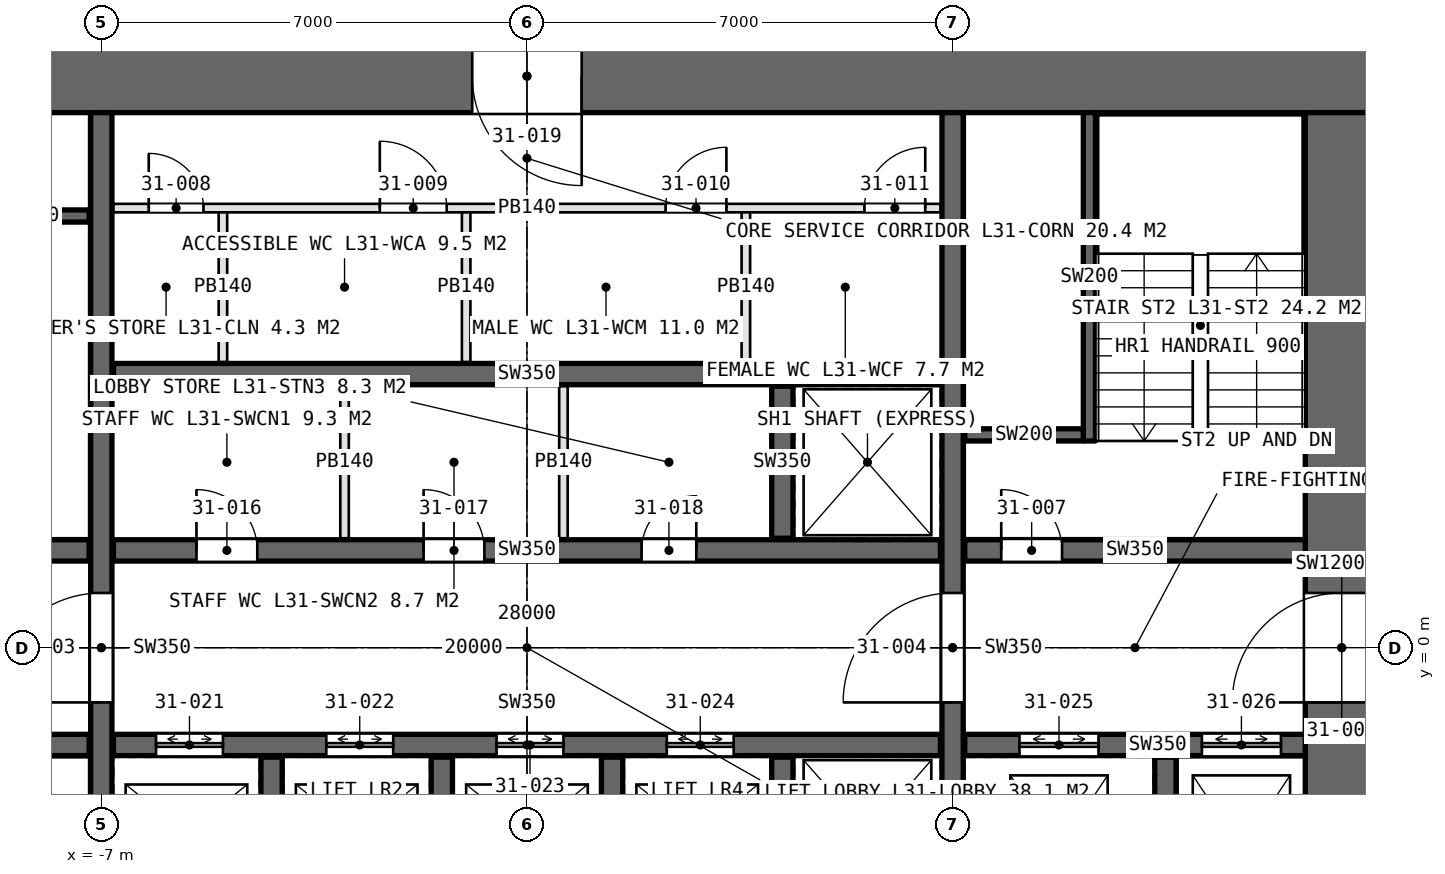
"""IFC4 building model, lengths in metres.
Left out: names, types, materials, properties, quantities, classifications, styles, units other than length and angle.
Written with IfcOpenShell. Run it as: python <this file> out.ifc"""

import sys

from ifc_helpers import new_model, si_unit, direction, frame, frame_2d, origin, place, context, subcontext, project, spatial, rectangle, extrude, element, fill, save


model = new_model("IFC4")
c1 = context("Model", 3, precision=1e-05, world=origin(), true_north=direction((0.0, 1.0)))
c2 = subcontext(c1, "Body", "Model", "MODEL_VIEW")
j1 = project(units=[si_unit("LENGTHUNIT", "METRE"), si_unit("PLANEANGLEUNIT", "RADIAN")], contexts=[c1])
p1 = place(None, origin())
s1 = spatial("IfcSite", under=j1, at=p1, CompositionType="ELEMENT")
p2 = place(p1, origin())
s2 = spatial("IfcBuilding", under=s1, at=p2, CompositionType="ELEMENT")
p3 = place(p2, frame((0.0, 0.0, 147.0)))
s3 = spatial("IfcBuildingStorey", under=s2, at=p3, CompositionType="ELEMENT", Elevation=147.0)
p4 = place(p3, frame((14.0, 9.4, 0.0), z_axis=(0.0, 0.0, 1.0), x_axis=(-1.0, 0.0, 0.0)))
e1 = element("IfcWall", 1, at=p4, inside=s3, PredefinedType="SHEAR", context=c2, shape_type="SweptSolid", body=[
    extrude(rectangle(XDim=28.0, YDim=1.2, at=frame_2d((14.0, 0.0))), origin(), (0.0, 0.0, 1.0), 4.2),
])
p5 = place(p4, frame((24.0, 0.0, 0.0)))
e2 = element("IfcOpeningElement", 2, at=p5, cuts=e1, PredefinedType="OPENING", context=c2, shape_type="SweptSolid", body=[
    extrude(rectangle(XDim=1.0, YDim=2.4, at=frame_2d((0.5, 1.2))), frame((0.0, 0.61, 0.0), z_axis=(0.0, -1.0, 0.0), x_axis=(1.0, 0.0, 0.0)), (0.0, 0.0, 1.0), 1.22),
])
p6 = place(p4, frame((13.1, 0.0, 0.0)))
e3 = element("IfcOpeningElement", 3, at=p6, cuts=e1, PredefinedType="OPENING", context=c2, shape_type="SweptSolid", body=[
    extrude(rectangle(XDim=1.8, YDim=2.4, at=frame_2d((0.9, 1.2))), frame((0.0, 0.61, 0.0), z_axis=(0.0, -1.0, 0.0), x_axis=(1.0, 0.0, 0.0)), (0.0, 0.0, 1.0), 1.22),
])
p7 = place(p3, frame((13.4, -8.8, 0.0), z_axis=(0.0, 0.0, 1.0), x_axis=(0.0, 1.0, 0.0)))
e4 = element("IfcWall", 4, at=p7, inside=s3, PredefinedType="SHEAR", context=c2, shape_type="SweptSolid", body=[
    extrude(rectangle(XDim=17.6, YDim=1.2, at=frame_2d((8.8, 0.0))), origin(), (0.0, 0.0, 1.0), 4.2),
])
p8 = place(p7, frame((7.9, 0.0, 0.0)))
e5 = element("IfcOpeningElement", 5, at=p8, cuts=e4, PredefinedType="OPENING", context=c2, shape_type="SweptSolid", body=[
    extrude(rectangle(XDim=1.8, YDim=2.4, at=frame_2d((0.9, 1.2))), frame((0.0, 0.61, 0.0), z_axis=(0.0, -1.0, 0.0), x_axis=(1.0, 0.0, 0.0)), (0.0, 0.0, 1.0), 1.22),
])
p9 = place(p3, frame((-7.0, -8.8, 0.0), z_axis=(0.0, 0.0, 1.0), x_axis=(0.0, 1.0, 0.0)))
e6 = element("IfcWall", 6, at=p9, inside=s3, PredefinedType="SHEAR", context=c2, shape_type="SweptSolid", body=[
    extrude(rectangle(XDim=17.6, YDim=0.35, at=frame_2d((8.8, 0.0))), origin(), (0.0, 0.0, 1.0), 4.2),
])
p10 = place(p9, frame((7.9, 0.0, 0.0)))
e7 = element("IfcOpeningElement", 7, at=p10, cuts=e6, PredefinedType="OPENING", context=c2, shape_type="SweptSolid", body=[
    extrude(rectangle(XDim=1.8, YDim=2.4, at=frame_2d((0.9, 1.2))), frame((0.0, 0.185, 0.0), z_axis=(0.0, -1.0, 0.0), x_axis=(1.0, 0.0, 0.0)), (0.0, 0.0, 1.0), 0.37),
])
p11 = place(p3, frame((7.0, -8.8, 0.0), z_axis=(0.0, 0.0, 1.0), x_axis=(0.0, 1.0, 0.0)))
e8 = element("IfcWall", 8, at=p11, inside=s3, PredefinedType="SHEAR", context=c2, shape_type="SweptSolid", body=[
    extrude(rectangle(XDim=17.6, YDim=0.35, at=frame_2d((8.8, 0.0))), origin(), (0.0, 0.0, 1.0), 4.2),
])
p12 = place(p11, frame((7.9, 0.0, 0.0)))
e9 = element("IfcOpeningElement", 9, at=p12, cuts=e8, PredefinedType="OPENING", context=c2, shape_type="SweptSolid", body=[
    extrude(rectangle(XDim=1.8, YDim=2.4, at=frame_2d((0.9, 1.2))), frame((0.0, 0.185, 0.0), z_axis=(0.0, -1.0, 0.0), x_axis=(1.0, 0.0, 0.0)), (0.0, 0.0, 1.0), 0.37),
])
p13 = place(p3, frame((-6.8, 1.6, 0.0), z_axis=(0.0, 0.0, 1.0), x_axis=(1.0, 0.0, 0.0)))
e10 = element("IfcWall", 10, at=p13, inside=s3, PredefinedType="SHEAR", context=c2, shape_type="SweptSolid", body=[
    extrude(rectangle(XDim=13.6, YDim=0.35, at=frame_2d((6.8, 0.0))), origin(), (0.0, 0.0, 1.0), 4.2),
])
p14 = place(p13, frame((1.365, 0.0, 0.0)))
e11 = element("IfcOpeningElement", 11, at=p14, cuts=e10, PredefinedType="OPENING", context=c2, shape_type="SweptSolid", body=[
    extrude(rectangle(XDim=1.0, YDim=2.4, at=frame_2d((0.5, 1.2))), frame((0.0, 0.185, 0.0), z_axis=(0.0, -1.0, 0.0), x_axis=(1.0, 0.0, 0.0)), (0.0, 0.0, 1.0), 0.37),
])
p15 = place(p13, frame((5.1, 0.0, 0.0)))
e12 = element("IfcOpeningElement", 12, at=p15, cuts=e10, PredefinedType="OPENING", context=c2, shape_type="SweptSolid", body=[
    extrude(rectangle(XDim=1.0, YDim=2.4, at=frame_2d((0.5, 1.2))), frame((0.0, 0.185, 0.0), z_axis=(0.0, -1.0, 0.0), x_axis=(1.0, 0.0, 0.0)), (0.0, 0.0, 1.0), 0.37),
])
p16 = place(p13, frame((8.685, 0.0, 0.0)))
e13 = element("IfcOpeningElement", 13, at=p16, cuts=e10, PredefinedType="OPENING", context=c2, shape_type="SweptSolid", body=[
    extrude(rectangle(XDim=0.9, YDim=2.4, at=frame_2d((0.45, 1.2))), frame((0.0, 0.185, 0.0), z_axis=(0.0, -1.0, 0.0), x_axis=(1.0, 0.0, 0.0)), (0.0, 0.0, 1.0), 0.37),
])
p17 = place(p3, frame((-6.8, -1.6, 0.0), z_axis=(0.0, 0.0, 1.0), x_axis=(1.0, 0.0, 0.0)))
e14 = element("IfcWall", 14, at=p17, inside=s3, PredefinedType="SHEAR", context=c2, shape_type="SweptSolid", body=[
    extrude(rectangle(XDim=13.6, YDim=0.35, at=frame_2d((6.8, 0.0))), origin(), (0.0, 0.0, 1.0), 4.2),
])
p18 = place(p17, frame((0.7, 0.0, 0.0)))
e15 = element("IfcOpeningElement", 15, at=p18, cuts=e14, PredefinedType="OPENING", context=c2, shape_type="SweptSolid", body=[
    extrude(rectangle(XDim=1.1, YDim=2.4, at=frame_2d((0.55, 1.2))), frame((0.0, 0.185, 0.0), z_axis=(0.0, -1.0, 0.0), x_axis=(1.0, 0.0, 0.0)), (0.0, 0.0, 1.0), 0.37),
])
p19 = place(p17, frame((3.5, 0.0, 0.0)))
e16 = element("IfcOpeningElement", 16, at=p19, cuts=e14, PredefinedType="OPENING", context=c2, shape_type="SweptSolid", body=[
    extrude(rectangle(XDim=1.1, YDim=2.4, at=frame_2d((0.55, 1.2))), frame((0.0, 0.185, 0.0), z_axis=(0.0, -1.0, 0.0), x_axis=(1.0, 0.0, 0.0)), (0.0, 0.0, 1.0), 0.37),
])
p20 = place(p17, frame((6.3, 0.0, 0.0)))
e17 = element("IfcOpeningElement", 17, at=p20, cuts=e14, PredefinedType="OPENING", context=c2, shape_type="SweptSolid", body=[
    extrude(rectangle(XDim=1.1, YDim=2.4, at=frame_2d((0.55, 1.2))), frame((0.0, 0.185, 0.0), z_axis=(0.0, -1.0, 0.0), x_axis=(1.0, 0.0, 0.0)), (0.0, 0.0, 1.0), 0.37),
])
p21 = place(p17, frame((9.1, 0.0, 0.0)))
e18 = element("IfcOpeningElement", 18, at=p21, cuts=e14, PredefinedType="OPENING", context=c2, shape_type="SweptSolid", body=[
    extrude(rectangle(XDim=1.1, YDim=2.4, at=frame_2d((0.55, 1.2))), frame((0.0, 0.185, 0.0), z_axis=(0.0, -1.0, 0.0), x_axis=(1.0, 0.0, 0.0)), (0.0, 0.0, 1.0), 0.37),
])
p22 = place(p3, frame((-6.8, 4.5, 0.0), z_axis=(0.0, 0.0, 1.0), x_axis=(1.0, 0.0, 0.0)))
e19 = element("IfcWall", 19, at=p22, inside=s3, PredefinedType="SHEAR", context=c2, shape_type="SweptSolid", body=[
    extrude(rectangle(XDim=13.6, YDim=0.35, at=frame_2d((6.8, 0.0))), origin(), (0.0, 0.0, 1.0), 4.2),
])
for number, where, z_axis, x_axis in (
    (20, (-12.8, 1.6, 0.0), (0.0, 0.0, 1.0), (1.0, 0.0, 0.0)),
    (21, (-12.8, -1.6, 0.0), (0.0, 0.0, 1.0), (1.0, 0.0, 0.0)),
):
    element("IfcWall", number, at=place(p3, frame(where, z_axis=z_axis, x_axis=x_axis)), inside=s3, PredefinedType="SHEAR", context=c2, shape_type="SweptSolid", body=[
        extrude(rectangle(XDim=5.6, YDim=0.35, at=frame_2d((2.8, 0.0))), origin(), (0.0, 0.0, 1.0), 4.2),
    ])
p23 = place(p3, frame((7.2, 1.6, 0.0), z_axis=(0.0, 0.0, 1.0), x_axis=(1.0, 0.0, 0.0)))
e22 = element("IfcWall", 22, at=p23, inside=s3, PredefinedType="SHEAR", context=c2, shape_type="SweptSolid", body=[
    extrude(rectangle(XDim=5.6, YDim=0.35, at=frame_2d((2.8, 0.0))), origin(), (0.0, 0.0, 1.0), 4.2),
])
p24 = place(p23, frame((0.6, 0.0, 0.0)))
e23 = element("IfcOpeningElement", 23, at=p24, cuts=e22, PredefinedType="OPENING", context=c2, shape_type="SweptSolid", body=[
    extrude(rectangle(XDim=1.0, YDim=2.4, at=frame_2d((0.5, 1.2))), frame((0.0, 0.185, 0.0), z_axis=(0.0, -1.0, 0.0), x_axis=(1.0, 0.0, 0.0)), (0.0, 0.0, 1.0), 0.37),
])
p25 = place(p3, frame((7.2, -1.6, 0.0), z_axis=(0.0, 0.0, 1.0), x_axis=(1.0, 0.0, 0.0)))
e24 = element("IfcWall", 24, at=p25, inside=s3, PredefinedType="SHEAR", context=c2, shape_type="SweptSolid", body=[
    extrude(rectangle(XDim=5.6, YDim=0.35, at=frame_2d((2.8, 0.0))), origin(), (0.0, 0.0, 1.0), 4.2),
])
p26 = place(p25, frame((0.9, 0.0, 0.0)))
e25 = element("IfcOpeningElement", 25, at=p26, cuts=e24, PredefinedType="OPENING", context=c2, shape_type="SweptSolid", body=[
    extrude(rectangle(XDim=1.3, YDim=2.4, at=frame_2d((0.65, 1.2))), frame((0.0, 0.185, 0.0), z_axis=(0.0, -1.0, 0.0), x_axis=(1.0, 0.0, 0.0)), (0.0, 0.0, 1.0), 0.37),
])
p27 = place(p25, frame((3.9, 0.0, 0.0)))
e26 = element("IfcOpeningElement", 26, at=p27, cuts=e24, PredefinedType="OPENING", context=c2, shape_type="SweptSolid", body=[
    extrude(rectangle(XDim=1.3, YDim=2.4, at=frame_2d((0.65, 1.2))), frame((0.0, 0.185, 0.0), z_axis=(0.0, -1.0, 0.0), x_axis=(1.0, 0.0, 0.0)), (0.0, 0.0, 1.0), 0.37),
])
p28 = place(p3, frame((10.5, -4.8, 0.0), z_axis=(0.0, 0.0, 1.0), x_axis=(0.0, 1.0, 0.0)))
e27 = element("IfcWall", 27, at=p28, inside=s3, PredefinedType="SHEAR", context=c2, shape_type="SweptSolid", body=[
    extrude(rectangle(XDim=3.0, YDim=0.35, at=frame_2d((1.5, 0.0))), origin(), (0.0, 0.0, 1.0), 4.2),
])
for number, where, z_axis, x_axis in (
    (28, (-4.2, -4.3, 0.0), (0.0, 0.0, 1.0), (0.0, 1.0, 0.0)),
    (29, (-1.4, -4.3, 0.0), (0.0, 0.0, 1.0), (0.0, 1.0, 0.0)),
    (30, (1.4, -4.3, 0.0), (0.0, 0.0, 1.0), (0.0, 1.0, 0.0)),
    (31, (4.2, 1.8, 0.0), (0.0, 0.0, 1.0), (0.0, 1.0, 0.0)),
    (32, (4.2, -4.3, 0.0), (0.0, 0.0, 1.0), (0.0, 1.0, 0.0)),
):
    element("IfcWall", number, at=place(p3, frame(where, z_axis=z_axis, x_axis=x_axis)), inside=s3, PredefinedType="SHEAR", context=c2, shape_type="SweptSolid", body=[
        extrude(rectangle(XDim=2.5, YDim=0.35, at=frame_2d((1.25, 0.0))), origin(), (0.0, 0.0, 1.0), 4.2),
    ])
p29 = place(p3, frame((-6.8, 7.23, 0.0), z_axis=(0.0, 0.0, 1.0), x_axis=(1.0, 0.0, 0.0)))
e33 = element("IfcWall", 33, at=p29, inside=s3, PredefinedType="PARTITIONING", context=c2, shape_type="SweptSolid", body=[
    extrude(rectangle(XDim=13.6, YDim=0.14, at=frame_2d((6.8, 0.0))), origin(), (0.0, 0.0, 1.0), 3.95),
])
p30 = place(p29, frame((0.58, 0.0, 0.0)))
e34 = element("IfcOpeningElement", 34, at=p30, cuts=e33, PredefinedType="OPENING", context=c2, shape_type="SweptSolid", body=[
    extrude(rectangle(XDim=0.9, YDim=2.4, at=frame_2d((0.45, 1.2))), frame((0.0, 0.08, 0.0), z_axis=(0.0, -1.0, 0.0), x_axis=(1.0, 0.0, 0.0)), (0.0, 0.0, 1.0), 0.16),
])
p31 = place(p29, frame((4.38, 0.0, 0.0)))
e35 = element("IfcOpeningElement", 35, at=p31, cuts=e33, PredefinedType="OPENING", context=c2, shape_type="SweptSolid", body=[
    extrude(rectangle(XDim=1.1, YDim=2.4, at=frame_2d((0.55, 1.2))), frame((0.0, 0.08, 0.0), z_axis=(0.0, -1.0, 0.0), x_axis=(1.0, 0.0, 0.0)), (0.0, 0.0, 1.0), 0.16),
])
p32 = place(p29, frame((9.08, 0.0, 0.0)))
e36 = element("IfcOpeningElement", 36, at=p32, cuts=e33, PredefinedType="OPENING", context=c2, shape_type="SweptSolid", body=[
    extrude(rectangle(XDim=1.0, YDim=2.4, at=frame_2d((0.5, 1.2))), frame((0.0, 0.08, 0.0), z_axis=(0.0, -1.0, 0.0), x_axis=(1.0, 0.0, 0.0)), (0.0, 0.0, 1.0), 0.16),
])
p33 = place(p29, frame((12.35, 0.0, 0.0)))
e37 = element("IfcOpeningElement", 37, at=p33, cuts=e33, PredefinedType="OPENING", context=c2, shape_type="SweptSolid", body=[
    extrude(rectangle(XDim=1.0, YDim=2.4, at=frame_2d((0.5, 1.2))), frame((0.0, 0.08, 0.0), z_axis=(0.0, -1.0, 0.0), x_axis=(1.0, 0.0, 0.0)), (0.0, 0.0, 1.0), 0.16),
])
for number, where, z_axis, x_axis in (
    (38, (-5.0, 4.7, 0.0), (0.0, 0.0, 1.0), (0.0, 1.0, 0.0)),
    (39, (-1.0, 4.7, 0.0), (0.0, 0.0, 1.0), (0.0, 1.0, 0.0)),
    (40, (3.6, 4.7, 0.0), (0.0, 0.0, 1.0), (0.0, 1.0, 0.0)),
):
    element("IfcWall", number, at=place(p3, frame(where, z_axis=z_axis, x_axis=x_axis)), inside=s3, PredefinedType="PARTITIONING", context=c2, shape_type="SweptSolid", body=[
        extrude(rectangle(XDim=2.46, YDim=0.14, at=frame_2d((1.23, 0.0))), origin(), (0.0, 0.0, 1.0), 3.95),
    ])
for number, where, z_axis, x_axis in (
    (41, (-3.0, 1.8, 0.0), (0.0, 0.0, 1.0), (0.0, 1.0, 0.0)),
    (42, (0.6, 1.8, 0.0), (0.0, 0.0, 1.0), (0.0, 1.0, 0.0)),
):
    element("IfcWall", number, at=place(p3, frame(where, z_axis=z_axis, x_axis=x_axis)), inside=s3, PredefinedType="PARTITIONING", context=c2, shape_type="SweptSolid", body=[
        extrude(rectangle(XDim=2.5, YDim=0.14, at=frame_2d((1.25, 0.0))), origin(), (0.0, 0.0, 1.0), 3.95),
    ])
p34 = place(p3, frame((-9.15, 7.1, 0.0), z_axis=(0.0, 0.0, 1.0), x_axis=(1.0, 0.0, 0.0)))
e43 = element("IfcWall", 43, at=p34, inside=s3, PredefinedType="SOLIDWALL", context=c2, shape_type="SweptSolid", body=[
    extrude(rectangle(XDim=1.95, YDim=0.2, at=frame_2d((0.975, 0.0))), origin(), (0.0, 0.0, 1.0), 4.2),
])
p35 = place(p3, frame((9.25, 3.4, 0.0), z_axis=(0.0, 0.0, 1.0), x_axis=(0.0, 1.0, 0.0)))
e44 = element("IfcWall", 44, at=p35, inside=s3, PredefinedType="SOLIDWALL", context=c2, shape_type="SweptSolid", body=[
    extrude(rectangle(XDim=5.4, YDim=0.2, at=frame_2d((2.7, 0.0))), origin(), (0.0, 0.0, 1.0), 4.2),
])
p36 = place(p3, frame((9.15, 3.5, 0.0), z_axis=(0.0, 0.0, 1.0), x_axis=(-1.0, 0.0, 0.0)))
e45 = element("IfcWall", 45, at=p36, inside=s3, PredefinedType="SOLIDWALL", context=c2, shape_type="SweptSolid", body=[
    extrude(rectangle(XDim=1.95, YDim=0.2, at=frame_2d((0.975, 0.0))), origin(), (0.0, 0.0, 1.0), 4.2),
])
p37 = place(p8, origin())
e46 = element("IfcDoor", 46, at=p37, inside=s3, OperationType="DOUBLE_DOOR_SINGLE_SWING", PredefinedType="DOOR", context=c2, shape_type="SweptSolid", body=[
    extrude(rectangle(XDim=1.8, YDim=2.4, at=frame_2d((0.9, 1.2))), frame((0.0, 0.025, 0.0), z_axis=(0.0, -1.0, 0.0), x_axis=(1.0, 0.0, 0.0)), (0.0, 0.0, 1.0), 0.05),
])
fill(e5, e46)
p38 = place(p10, origin())
e47 = element("IfcDoor", 47, at=p38, inside=s3, OperationType="DOUBLE_DOOR_SINGLE_SWING", PredefinedType="DOOR", context=c2, shape_type="SweptSolid", body=[
    extrude(rectangle(XDim=1.8, YDim=2.4, at=frame_2d((0.9, 1.2))), frame((0.0, 0.025, 0.0), z_axis=(0.0, -1.0, 0.0), x_axis=(1.0, 0.0, 0.0)), (0.0, 0.0, 1.0), 0.05),
])
fill(e7, e47)
p39 = place(p12, origin())
e48 = element("IfcDoor", 48, at=p39, inside=s3, OperationType="DOUBLE_DOOR_SINGLE_SWING", PredefinedType="DOOR", context=c2, shape_type="SweptSolid", body=[
    extrude(rectangle(XDim=1.8, YDim=2.4, at=frame_2d((0.9, 1.2))), frame((0.0, 0.025, 0.0), z_axis=(0.0, -1.0, 0.0), x_axis=(1.0, 0.0, 0.0)), (0.0, 0.0, 1.0), 0.05),
])
fill(e9, e48)
p40 = place(p24, origin())
e49 = element("IfcDoor", 49, at=p40, inside=s3, OperationType="SINGLE_SWING_LEFT", PredefinedType="DOOR", context=c2, shape_type="SweptSolid", body=[
    extrude(rectangle(XDim=1.0, YDim=2.4, at=frame_2d((0.5, 1.2))), frame((0.0, 0.025, 0.0), z_axis=(0.0, -1.0, 0.0), x_axis=(1.0, 0.0, 0.0)), (0.0, 0.0, 1.0), 0.05),
])
fill(e23, e49)
p41 = place(p30, origin())
e50 = element("IfcDoor", 50, at=p41, inside=s3, OperationType="SINGLE_SWING_LEFT", PredefinedType="DOOR", context=c2, shape_type="SweptSolid", body=[
    extrude(rectangle(XDim=0.9, YDim=2.4, at=frame_2d((0.45, 1.2))), frame((0.0, 0.025, 0.0), z_axis=(0.0, -1.0, 0.0), x_axis=(1.0, 0.0, 0.0)), (0.0, 0.0, 1.0), 0.05),
])
fill(e34, e50)
p42 = place(p31, origin())
e51 = element("IfcDoor", 51, at=p42, inside=s3, OperationType="SINGLE_SWING_LEFT", PredefinedType="DOOR", context=c2, shape_type="SweptSolid", body=[
    extrude(rectangle(XDim=1.1, YDim=2.4, at=frame_2d((0.55, 1.2))), frame((0.0, 0.025, 0.0), z_axis=(0.0, -1.0, 0.0), x_axis=(1.0, 0.0, 0.0)), (0.0, 0.0, 1.0), 0.05),
])
fill(e35, e51)
p43 = place(p32, origin())
e52 = element("IfcDoor", 52, at=p43, inside=s3, OperationType="SINGLE_SWING_RIGHT", PredefinedType="DOOR", context=c2, shape_type="SweptSolid", body=[
    extrude(rectangle(XDim=1.0, YDim=2.4, at=frame_2d((0.5, 1.2))), frame((0.0, 0.025, 0.0), z_axis=(0.0, -1.0, 0.0), x_axis=(1.0, 0.0, 0.0)), (0.0, 0.0, 1.0), 0.05),
])
fill(e36, e52)
p44 = place(p33, origin())
e53 = element("IfcDoor", 53, at=p44, inside=s3, OperationType="SINGLE_SWING_RIGHT", PredefinedType="DOOR", context=c2, shape_type="SweptSolid", body=[
    extrude(rectangle(XDim=1.0, YDim=2.4, at=frame_2d((0.5, 1.2))), frame((0.0, 0.025, 0.0), z_axis=(0.0, -1.0, 0.0), x_axis=(1.0, 0.0, 0.0)), (0.0, 0.0, 1.0), 0.05),
])
fill(e37, e53)
p45 = place(p14, origin())
e54 = element("IfcDoor", 54, at=p45, inside=s3, OperationType="SINGLE_SWING_LEFT", PredefinedType="DOOR", context=c2, shape_type="SweptSolid", body=[
    extrude(rectangle(XDim=1.0, YDim=2.4, at=frame_2d((0.5, 1.2))), frame((0.0, 0.025, 0.0), z_axis=(0.0, -1.0, 0.0), x_axis=(1.0, 0.0, 0.0)), (0.0, 0.0, 1.0), 0.05),
])
fill(e11, e54)
p46 = place(p15, origin())
e55 = element("IfcDoor", 55, at=p46, inside=s3, OperationType="SINGLE_SWING_LEFT", PredefinedType="DOOR", context=c2, shape_type="SweptSolid", body=[
    extrude(rectangle(XDim=1.0, YDim=2.4, at=frame_2d((0.5, 1.2))), frame((0.0, 0.025, 0.0), z_axis=(0.0, -1.0, 0.0), x_axis=(1.0, 0.0, 0.0)), (0.0, 0.0, 1.0), 0.05),
])
fill(e12, e55)
p47 = place(p16, origin())
e56 = element("IfcDoor", 56, at=p47, inside=s3, OperationType="SINGLE_SWING_RIGHT", PredefinedType="DOOR", context=c2, shape_type="SweptSolid", body=[
    extrude(rectangle(XDim=0.9, YDim=2.4, at=frame_2d((0.45, 1.2))), frame((0.0, 0.025, 0.0), z_axis=(0.0, -1.0, 0.0), x_axis=(1.0, 0.0, 0.0)), (0.0, 0.0, 1.0), 0.05),
])
fill(e13, e56)
p48 = place(p6, origin())
e57 = element("IfcDoor", 57, at=p48, inside=s3, OperationType="DOUBLE_DOOR_SINGLE_SWING", PredefinedType="DOOR", context=c2, shape_type="SweptSolid", body=[
    extrude(rectangle(XDim=1.8, YDim=2.4, at=frame_2d((0.9, 1.2))), frame((0.0, 0.025, 0.0), z_axis=(0.0, -1.0, 0.0), x_axis=(1.0, 0.0, 0.0)), (0.0, 0.0, 1.0), 0.05),
])
fill(e3, e57)
p49 = place(p18, origin())
e58 = element("IfcDoor", 58, at=p49, inside=s3, OperationType="DOUBLE_DOOR_SLIDING", PredefinedType="DOOR", context=c2, shape_type="SweptSolid", body=[
    extrude(rectangle(XDim=1.1, YDim=2.4, at=frame_2d((0.55, 1.2))), frame((0.0, 0.025, 0.0), z_axis=(0.0, -1.0, 0.0), x_axis=(1.0, 0.0, 0.0)), (0.0, 0.0, 1.0), 0.05),
])
fill(e15, e58)
p50 = place(p19, origin())
e59 = element("IfcDoor", 59, at=p50, inside=s3, OperationType="DOUBLE_DOOR_SLIDING", PredefinedType="DOOR", context=c2, shape_type="SweptSolid", body=[
    extrude(rectangle(XDim=1.1, YDim=2.4, at=frame_2d((0.55, 1.2))), frame((0.0, 0.025, 0.0), z_axis=(0.0, -1.0, 0.0), x_axis=(1.0, 0.0, 0.0)), (0.0, 0.0, 1.0), 0.05),
])
fill(e16, e59)
p51 = place(p20, origin())
e60 = element("IfcDoor", 60, at=p51, inside=s3, OperationType="DOUBLE_DOOR_SLIDING", PredefinedType="DOOR", context=c2, shape_type="SweptSolid", body=[
    extrude(rectangle(XDim=1.1, YDim=2.4, at=frame_2d((0.55, 1.2))), frame((0.0, 0.025, 0.0), z_axis=(0.0, -1.0, 0.0), x_axis=(1.0, 0.0, 0.0)), (0.0, 0.0, 1.0), 0.05),
])
fill(e17, e60)
p52 = place(p21, origin())
e61 = element("IfcDoor", 61, at=p52, inside=s3, OperationType="DOUBLE_DOOR_SLIDING", PredefinedType="DOOR", context=c2, shape_type="SweptSolid", body=[
    extrude(rectangle(XDim=1.1, YDim=2.4, at=frame_2d((0.55, 1.2))), frame((0.0, 0.025, 0.0), z_axis=(0.0, -1.0, 0.0), x_axis=(1.0, 0.0, 0.0)), (0.0, 0.0, 1.0), 0.05),
])
fill(e18, e61)
p53 = place(p26, origin())
e62 = element("IfcDoor", 62, at=p53, inside=s3, OperationType="DOUBLE_DOOR_SLIDING", PredefinedType="DOOR", context=c2, shape_type="SweptSolid", body=[
    extrude(rectangle(XDim=1.3, YDim=2.4, at=frame_2d((0.65, 1.2))), frame((0.0, 0.025, 0.0), z_axis=(0.0, -1.0, 0.0), x_axis=(1.0, 0.0, 0.0)), (0.0, 0.0, 1.0), 0.05),
])
fill(e25, e62)
p54 = place(p27, origin())
e63 = element("IfcDoor", 63, at=p54, inside=s3, OperationType="DOUBLE_DOOR_SLIDING", PredefinedType="DOOR", context=c2, shape_type="SweptSolid", body=[
    extrude(rectangle(XDim=1.3, YDim=2.4, at=frame_2d((0.65, 1.2))), frame((0.0, 0.025, 0.0), z_axis=(0.0, -1.0, 0.0), x_axis=(1.0, 0.0, 0.0)), (0.0, 0.0, 1.0), 0.05),
])
fill(e26, e63)
save(model, sys.argv[1])
